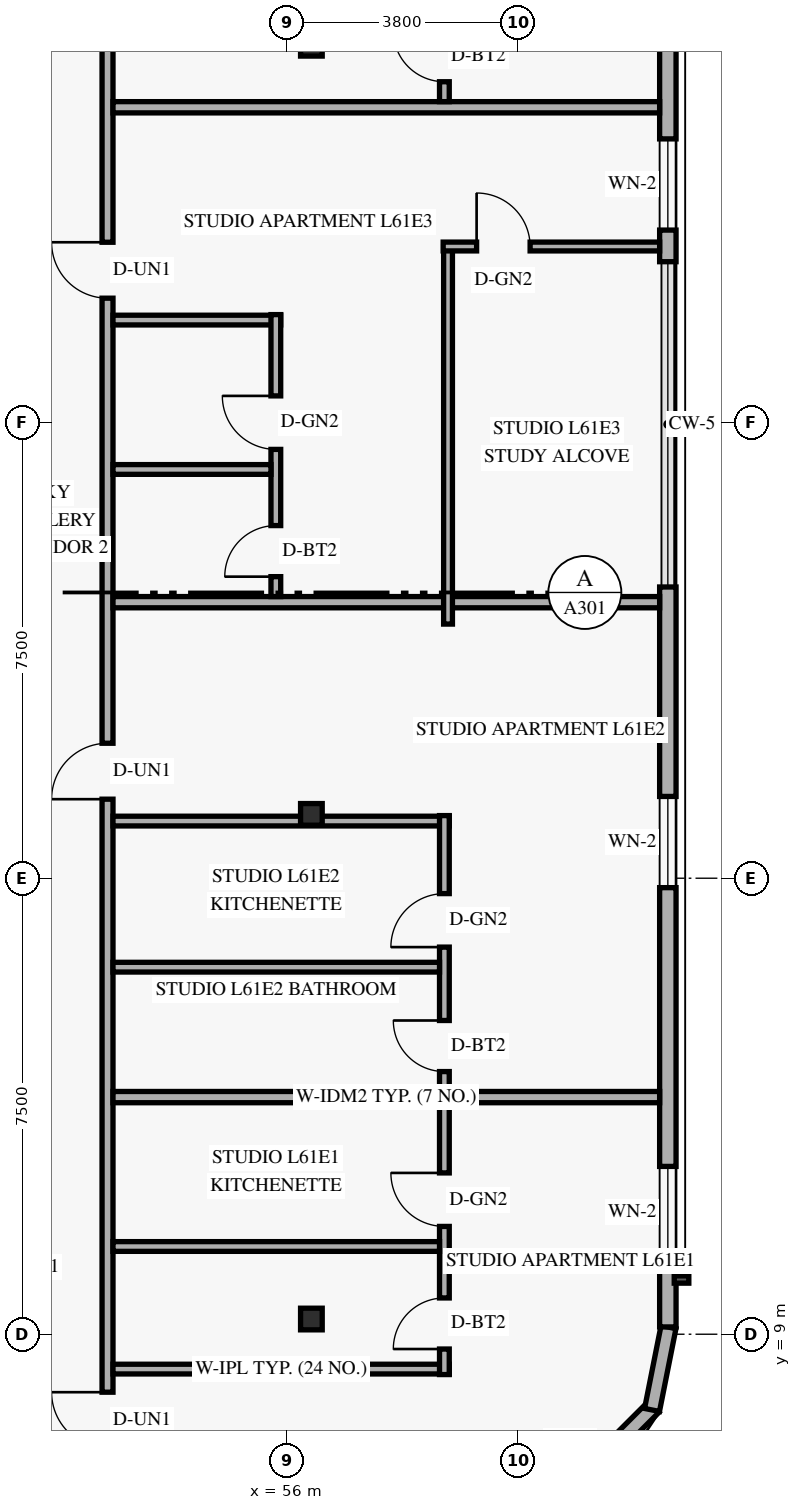
"""IFC4 building model, lengths in metres.
Left out: names, types, materials, properties, quantities, classifications, styles, units other than length and angle.
Written with IfcOpenShell. Run it as: python <this file> out.ifc"""

import sys

from ifc_helpers import new_model, si_unit, direction, frame, frame_2d, origin, origin_2d, place, context, subcontext, project, spatial, rectangle, hollow_rectangle, extrude, element, fill, save


model = new_model("IFC4")
c1 = context("Model", 3, precision=1e-05, world=origin(), true_north=direction((0.0, 1.0)))
c2 = subcontext(c1, "Body", "Model", "MODEL_VIEW")
j1 = project(units=[si_unit("LENGTHUNIT", "METRE"), si_unit("PLANEANGLEUNIT", "RADIAN")], contexts=[c1])
p1 = place(None, origin())
s1 = spatial("IfcSite", under=j1, at=p1, CompositionType="ELEMENT")
p2 = place(p1, origin())
s2 = spatial("IfcBuilding", under=s1, at=p2, CompositionType="ELEMENT")
p3 = place(p2, frame((0.0, 0.0, 235.2)))
s3 = spatial("IfcBuildingStorey", under=s2, at=p3, CompositionType="ELEMENT", Elevation=235.2)
for number, where, z_axis, x_axis in (
    (1, (56.298, 9.25, 0.0), (0.058, 0.0, 0.998), (0.0, 1.0, 0.0)),
    (2, (56.298, 17.55, 0.0), (0.058, 0.0, 0.998), (0.0, 1.0, 0.0)),
    (3, (56.298, 30.2, 0.0), (0.058, 0.0, 0.998), (0.0, 1.0, 0.0)),
):
    element("IfcColumn", number, at=place(p3, frame(where, z_axis=z_axis, x_axis=x_axis)), inside=s3, PredefinedType="COLUMN", context=c2, shape_type="SweptSolid", body=[
        extrude(hollow_rectangle(XDim=0.356, YDim=0.356, WallThickness=0.016, at=origin_2d()), origin(), (0.0, 0.0, 1.0), 3.606),
    ])
p4 = place(p3, frame((60.095, 5.868, 0.0), z_axis=(0.0, 0.0, 1.0), x_axis=(0.707106781187, 0.707106781187, 0.0)))
e4 = element("IfcWall", 4, at=p4, inside=s3, PredefinedType="SOLIDWALL", context=c2, shape_type="SweptSolid", body=[
    extrude(rectangle(XDim=2.739, YDim=0.25, at=frame_2d((1.37, 0.0))), origin(), (0.0, 0.0, 1.0), 3.36),
])
p5 = place(p4, frame((0.77, 0.0, 0.85)))
e5 = element("IfcOpeningElement", 5, at=p5, cuts=e4, PredefinedType="OPENING", context=c2, shape_type="SweptSolid", body=[
    extrude(rectangle(XDim=1.2, YDim=1.5, at=frame_2d((0.6, 0.75))), frame((0.0, 0.135, 0.0), z_axis=(0.0, -1.0, 0.0), x_axis=(1.0, 0.0, 0.0)), (0.0, 0.0, 1.0), 0.27),
])
p6 = place(p3, frame((62.005, 7.754, 0.0), z_axis=(0.0, 0.0, 1.0), x_axis=(0.195135625965, 0.9807762678, 0.0)))
e6 = element("IfcWall", 6, at=p6, inside=s3, PredefinedType="SOLIDWALL", context=c2, shape_type="SweptSolid", body=[
    extrude(rectangle(XDim=1.389, YDim=0.25, at=frame_2d((0.694, 0.0))), origin(), (0.0, 0.0, 1.0), 3.36),
])
p7 = place(p3, frame((62.265, 9.12, 0.0), z_axis=(0.0, 0.0, 1.0), x_axis=(0.0, 1.0, 0.0)))
e7 = element("IfcWall", 7, at=p7, inside=s3, PredefinedType="SOLIDWALL", context=c2, shape_type="SweptSolid", body=[
    extrude(rectangle(XDim=12.17, YDim=0.27, at=frame_2d((6.085, 0.0))), origin(), (0.0, 0.0, 1.0), 3.36),
])
p8 = place(p7, frame((1.14, 0.0, 0.85)))
e8 = element("IfcOpeningElement", 8, at=p8, cuts=e7, PredefinedType="OPENING", context=c2, shape_type="SweptSolid", body=[
    extrude(rectangle(XDim=1.5, YDim=1.55, at=frame_2d((0.75, 0.775))), frame((0.0, 0.145, 0.0), z_axis=(0.0, -1.0, 0.0), x_axis=(1.0, 0.0, 0.0)), (0.0, 0.0, 1.0), 0.29),
])
p9 = place(p7, frame((7.225, 0.0, 0.85)))
e9 = element("IfcOpeningElement", 9, at=p9, cuts=e7, PredefinedType="OPENING", context=c2, shape_type="SweptSolid", body=[
    extrude(rectangle(XDim=1.5, YDim=1.55, at=frame_2d((0.75, 0.775))), frame((0.0, 0.145, 0.0), z_axis=(0.0, -1.0, 0.0), x_axis=(1.0, 0.0, 0.0)), (0.0, 0.0, 1.0), 0.29),
])
p10 = place(p3, frame((62.265, 26.64, 0.0), z_axis=(0.0, 0.0, 1.0), x_axis=(0.0, 1.0, 0.0)))
e10 = element("IfcWall", 10, at=p10, inside=s3, PredefinedType="SOLIDWALL", context=c2, shape_type="SweptSolid", body=[
    extrude(rectangle(XDim=12.24, YDim=0.27, at=frame_2d((6.12, 0.0))), origin(), (0.0, 0.0, 1.0), 3.36),
])
p11 = place(p10, frame((0.52, 0.0, 0.85)))
e11 = element("IfcOpeningElement", 11, at=p11, cuts=e10, PredefinedType="OPENING", context=c2, shape_type="SweptSolid", body=[
    extrude(rectangle(XDim=1.5, YDim=1.55, at=frame_2d((0.75, 0.775))), frame((0.0, 0.145, 0.0), z_axis=(0.0, -1.0, 0.0), x_axis=(1.0, 0.0, 0.0)), (0.0, 0.0, 1.0), 0.29),
])
p12 = place(p10, frame((5.305, 0.0, 0.85)))
e12 = element("IfcOpeningElement", 12, at=p12, cuts=e10, PredefinedType="OPENING", context=c2, shape_type="SweptSolid", body=[
    extrude(rectangle(XDim=1.5, YDim=1.55, at=frame_2d((0.75, 0.775))), frame((0.0, 0.145, 0.0), z_axis=(0.0, -1.0, 0.0), x_axis=(1.0, 0.0, 0.0)), (0.0, 0.0, 1.0), 0.29),
])
p13 = place(p10, frame((10.155, 0.0, 0.85)))
e13 = element("IfcOpeningElement", 13, at=p13, cuts=e10, PredefinedType="OPENING", context=c2, shape_type="SweptSolid", body=[
    extrude(rectangle(XDim=1.5, YDim=1.55, at=frame_2d((0.75, 0.775))), frame((0.0, 0.145, 0.0), z_axis=(0.0, -1.0, 0.0), x_axis=(1.0, 0.0, 0.0)), (0.0, 0.0, 1.0), 0.29),
])
p14 = place(p3, frame((53.05, 5.77, 0.0), z_axis=(0.0, 0.0, 1.0), x_axis=(0.0, 1.0, 0.0)))
e14 = element("IfcWall", 14, at=p14, inside=s3, PredefinedType="STANDARD", context=c2, shape_type="SweptSolid", body=[
    extrude(rectangle(XDim=36.46, YDim=0.18, at=frame_2d((18.23, 0.0))), origin(), (0.0, 0.0, 1.0), 2.803),
])
p15 = place(p14, frame((1.357, 0.0, 0.0)))
e15 = element("IfcOpeningElement", 15, at=p15, cuts=e14, PredefinedType="OPENING", context=c2, shape_type="SweptSolid", body=[
    extrude(rectangle(XDim=0.92, YDim=2.15, at=frame_2d((0.46, 1.075))), frame((0.0, 0.1, 0.0), z_axis=(0.0, -1.0, 0.0), x_axis=(1.0, 0.0, 0.0)), (0.0, 0.0, 1.0), 0.2),
])
p16 = place(p14, frame((12.03, 0.0, 0.0)))
e16 = element("IfcOpeningElement", 16, at=p16, cuts=e14, PredefinedType="OPENING", context=c2, shape_type="SweptSolid", body=[
    extrude(rectangle(XDim=0.92, YDim=2.15, at=frame_2d((0.46, 1.075))), frame((0.0, 0.1, 0.0), z_axis=(0.0, -1.0, 0.0), x_axis=(1.0, 0.0, 0.0)), (0.0, 0.0, 1.0), 0.2),
])
p17 = place(p14, frame((20.27, 0.0, 0.0)))
e17 = element("IfcOpeningElement", 17, at=p17, cuts=e14, PredefinedType="OPENING", context=c2, shape_type="SweptSolid", body=[
    extrude(rectangle(XDim=0.92, YDim=2.15, at=frame_2d((0.46, 1.075))), frame((0.0, 0.1, 0.0), z_axis=(0.0, -1.0, 0.0), x_axis=(1.0, 0.0, 0.0)), (0.0, 0.0, 1.0), 0.2),
])
p18 = place(p14, frame((28.21, 0.0, 0.0)))
e18 = element("IfcOpeningElement", 18, at=p18, cuts=e14, PredefinedType="OPENING", context=c2, shape_type="SweptSolid", body=[
    extrude(rectangle(XDim=0.92, YDim=2.15, at=frame_2d((0.46, 1.075))), frame((0.0, 0.1, 0.0), z_axis=(0.0, -1.0, 0.0), x_axis=(1.0, 0.0, 0.0)), (0.0, 0.0, 1.0), 0.2),
])
p19 = place(p14, frame((35.21, 0.0, 0.0)))
e19 = element("IfcOpeningElement", 19, at=p19, cuts=e14, PredefinedType="OPENING", context=c2, shape_type="SweptSolid", body=[
    extrude(rectangle(XDim=0.92, YDim=2.15, at=frame_2d((0.46, 1.075))), frame((0.0, 0.1, 0.0), z_axis=(0.0, -1.0, 0.0), x_axis=(1.0, 0.0, 0.0)), (0.0, 0.0, 1.0), 0.2),
])
p20 = place(p3, frame((53.14, 8.427, 0.0), z_axis=(0.0, 0.0, 1.0), x_axis=(1.0, 0.0, 0.0)))
e20 = element("IfcWall", 20, at=p20, inside=s3, PredefinedType="PLUMBINGWALL", context=c2, shape_type="SweptSolid", body=[
    extrude(rectangle(XDim=5.53, YDim=0.16, at=frame_2d((2.765, 0.0))), origin(), (0.0, 0.0, 1.0), 2.879),
])
p21 = place(p3, frame((58.59, 8.337, 0.0), z_axis=(0.0, 0.0, 1.0), x_axis=(0.0, 1.0, 0.0)))
e21 = element("IfcWall", 21, at=p21, inside=s3, PredefinedType="PLUMBINGWALL", context=c2, shape_type="SweptSolid", body=[
    extrude(rectangle(XDim=4.563, YDim=0.16, at=frame_2d((2.282, 0.0))), origin(), (0.0, 0.0, 1.0), 3.36),
])
p22 = place(p21, frame((0.42, 0.0, 0.0)))
e22 = element("IfcOpeningElement", 22, at=p22, cuts=e21, PredefinedType="OPENING", context=c2, shape_type="SweptSolid", body=[
    extrude(rectangle(XDim=0.84, YDim=2.12, at=frame_2d((0.42, 1.06))), frame((0.0, 0.09, 0.0), z_axis=(0.0, -1.0, 0.0), x_axis=(1.0, 0.0, 0.0)), (0.0, 0.0, 1.0), 0.18),
])
p23 = place(p21, frame((2.436, 0.0, 0.0)))
e23 = element("IfcOpeningElement", 23, at=p23, cuts=e21, PredefinedType="OPENING", context=c2, shape_type="SweptSolid", body=[
    extrude(rectangle(XDim=0.88, YDim=2.12, at=frame_2d((0.44, 1.06))), frame((0.0, 0.09, 0.0), z_axis=(0.0, -1.0, 0.0), x_axis=(1.0, 0.0, 0.0)), (0.0, 0.0, 1.0), 0.18),
])
p24 = place(p3, frame((53.14, 10.443, 0.0), z_axis=(0.0, 0.0, 1.0), x_axis=(1.0, 0.0, 0.0)))
e24 = element("IfcWall", 24, at=p24, inside=s3, PredefinedType="PLUMBINGWALL", context=c2, shape_type="SweptSolid", body=[
    extrude(rectangle(XDim=5.37, YDim=0.16, at=frame_2d((2.685, 0.0))), origin(), (0.0, 0.0, 1.0), 2.879),
])
p25 = place(p3, frame((53.14, 12.9, 0.0), z_axis=(0.0, 0.0, 1.0), x_axis=(1.0, 0.0, 0.0)))
e25 = element("IfcWall", 25, at=p25, inside=s3, PredefinedType="PARTITIONING", context=c2, shape_type="SweptSolid", body=[
    extrude(rectangle(XDim=8.99, YDim=0.185, at=frame_2d((4.495, 0.0))), origin(), (0.0, 0.0, 1.0), 2.879),
])
p26 = place(p3, frame((53.14, 17.44, 0.0), z_axis=(0.0, 0.0, 1.0), x_axis=(1.0, 0.0, 0.0)))
e26 = element("IfcWall", 26, at=p26, inside=s3, PredefinedType="PLUMBINGWALL", context=c2, shape_type="SweptSolid", body=[
    extrude(rectangle(XDim=5.53, YDim=0.16, at=frame_2d((2.765, 0.0))), origin(), (0.0, 0.0, 1.0), 2.803),
])
p27 = place(p3, frame((58.59, 12.992, 0.0), z_axis=(0.0, 0.0, 1.0), x_axis=(0.0, 1.0, 0.0)))
e27 = element("IfcWall", 27, at=p27, inside=s3, PredefinedType="PLUMBINGWALL", context=c2, shape_type="SweptSolid", body=[
    extrude(rectangle(XDim=4.538, YDim=0.16, at=frame_2d((2.269, 0.0))), origin(), (0.0, 0.0, 1.0), 3.36),
])
p28 = place(p27, frame((0.327, 0.0, 0.0)))
e28 = element("IfcOpeningElement", 28, at=p28, cuts=e27, PredefinedType="OPENING", context=c2, shape_type="SweptSolid", body=[
    extrude(rectangle(XDim=0.84, YDim=2.12, at=frame_2d((0.42, 1.06))), frame((0.0, 0.09, 0.0), z_axis=(0.0, -1.0, 0.0), x_axis=(1.0, 0.0, 0.0)), (0.0, 0.0, 1.0), 0.18),
])
p29 = place(p27, frame((2.375, 0.0, 0.0)))
e29 = element("IfcOpeningElement", 29, at=p29, cuts=e27, PredefinedType="OPENING", context=c2, shape_type="SweptSolid", body=[
    extrude(rectangle(XDim=0.88, YDim=2.12, at=frame_2d((0.44, 1.06))), frame((0.0, 0.09, 0.0), z_axis=(0.0, -1.0, 0.0), x_axis=(1.0, 0.0, 0.0)), (0.0, 0.0, 1.0), 0.18),
])
p30 = place(p3, frame((53.14, 15.037, 0.0), z_axis=(0.0, 0.0, 1.0), x_axis=(1.0, 0.0, 0.0)))
e30 = element("IfcWall", 30, at=p30, inside=s3, PredefinedType="PLUMBINGWALL", context=c2, shape_type="SweptSolid", body=[
    extrude(rectangle(XDim=5.37, YDim=0.16, at=frame_2d((2.685, 0.0))), origin(), (0.0, 0.0, 1.0), 2.879),
])
p31 = place(p3, frame((53.14, 21.04, 0.0), z_axis=(0.0, 0.0, 1.0), x_axis=(1.0, 0.0, 0.0)))
e31 = element("IfcWall", 31, at=p31, inside=s3, PredefinedType="PARTITIONING", context=c2, shape_type="SweptSolid", body=[
    extrude(rectangle(XDim=8.99, YDim=0.185, at=frame_2d((4.495, 0.0))), origin(), (0.0, 0.0, 1.0), 2.879),
])
p32 = place(p3, frame((53.14, 25.68, 0.0), z_axis=(0.0, 0.0, 1.0), x_axis=(1.0, 0.0, 0.0)))
e32 = element("IfcWall", 32, at=p32, inside=s3, PredefinedType="PLUMBINGWALL", context=c2, shape_type="SweptSolid", body=[
    extrude(rectangle(XDim=2.758, YDim=0.16, at=frame_2d((1.379, 0.0))), origin(), (0.0, 0.0, 1.0), 3.36),
])
p33 = place(p3, frame((55.818, 21.133, 0.0), z_axis=(0.0, 0.0, 1.0), x_axis=(0.0, 1.0, 0.0)))
e33 = element("IfcWall", 33, at=p33, inside=s3, PredefinedType="PLUMBINGWALL", context=c2, shape_type="SweptSolid", body=[
    extrude(rectangle(XDim=4.637, YDim=0.16, at=frame_2d((2.319, 0.0))), origin(), (0.0, 0.0, 1.0), 3.36),
])
p34 = place(p33, frame((0.327, 0.0, 0.0)))
e34 = element("IfcOpeningElement", 34, at=p34, cuts=e33, PredefinedType="OPENING", context=c2, shape_type="SweptSolid", body=[
    extrude(rectangle(XDim=0.84, YDim=2.12, at=frame_2d((0.42, 1.06))), frame((0.0, 0.09, 0.0), z_axis=(0.0, -1.0, 0.0), x_axis=(1.0, 0.0, 0.0)), (0.0, 0.0, 1.0), 0.18),
])
p35 = place(p33, frame((2.42, 0.0, 0.0)))
e35 = element("IfcOpeningElement", 35, at=p35, cuts=e33, PredefinedType="OPENING", context=c2, shape_type="SweptSolid", body=[
    extrude(rectangle(XDim=0.88, YDim=2.12, at=frame_2d((0.44, 1.06))), frame((0.0, 0.09, 0.0), z_axis=(0.0, -1.0, 0.0), x_axis=(1.0, 0.0, 0.0)), (0.0, 0.0, 1.0), 0.18),
])
p36 = place(p3, frame((53.14, 23.223, 0.0), z_axis=(0.0, 0.0, 1.0), x_axis=(1.0, 0.0, 0.0)))
e36 = element("IfcWall", 36, at=p36, inside=s3, PredefinedType="PLUMBINGWALL", context=c2, shape_type="SweptSolid", body=[
    extrude(rectangle(XDim=2.598, YDim=0.16, at=frame_2d((1.299, 0.0))), origin(), (0.0, 0.0, 1.0), 3.36),
])
p37 = place(p3, frame((58.65, 20.68, 0.0), z_axis=(0.0, 0.0, 1.0), x_axis=(0.0, 1.0, 0.0)))
e37 = element("IfcWall", 37, at=p37, inside=s3, PredefinedType="PARTITIONING", context=c2, shape_type="SweptSolid", body=[
    extrude(rectangle(XDim=6.21, YDim=0.145, at=frame_2d((3.105, 0.0))), origin(), (0.0, 0.0, 1.0), 3.36),
])
p38 = place(p3, frame((58.57, 26.89, 0.0), z_axis=(0.0, 0.0, 1.0), x_axis=(1.0, 0.0, 0.0)))
e38 = element("IfcWall", 38, at=p38, inside=s3, PredefinedType="PARTITIONING", context=c2, shape_type="SweptSolid", body=[
    extrude(rectangle(XDim=3.56, YDim=0.145, at=frame_2d((1.78, 0.0))), origin(), (0.0, 0.0, 1.0), 3.36),
])
p39 = place(p38, frame((0.55, 0.0, 0.0)))
e39 = element("IfcOpeningElement", 39, at=p39, cuts=e38, PredefinedType="OPENING", context=c2, shape_type="SweptSolid", body=[
    extrude(rectangle(XDim=0.88, YDim=2.12, at=frame_2d((0.44, 1.06))), frame((0.0, 0.083, 0.0), z_axis=(0.0, -1.0, 0.0), x_axis=(1.0, 0.0, 0.0)), (0.0, 0.0, 1.0), 0.165),
])
p40 = place(p3, frame((53.14, 29.18, 0.0), z_axis=(0.0, 0.0, 1.0), x_axis=(1.0, 0.0, 0.0)))
e40 = element("IfcWall", 40, at=p40, inside=s3, PredefinedType="PARTITIONING", context=c2, shape_type="SweptSolid", body=[
    extrude(rectangle(XDim=8.99, YDim=0.185, at=frame_2d((4.495, 0.0))), origin(), (0.0, 0.0, 1.0), 2.879),
])
p41 = place(p3, frame((58.59, 29.272, 0.0), z_axis=(0.0, 0.0, 1.0), x_axis=(0.0, 1.0, 0.0)))
e41 = element("IfcWall", 41, at=p41, inside=s3, PredefinedType="PLUMBINGWALL", context=c2, shape_type="SweptSolid", body=[
    extrude(rectangle(XDim=4.438, YDim=0.16, at=frame_2d((2.219, 0.0))), origin(), (0.0, 0.0, 1.0), 3.36),
])
p42 = place(p41, frame((0.327, 0.0, 0.0)))
e42 = element("IfcOpeningElement", 42, at=p42, cuts=e41, PredefinedType="OPENING", context=c2, shape_type="SweptSolid", body=[
    extrude(rectangle(XDim=0.84, YDim=2.12, at=frame_2d((0.42, 1.06))), frame((0.0, 0.09, 0.0), z_axis=(0.0, -1.0, 0.0), x_axis=(1.0, 0.0, 0.0)), (0.0, 0.0, 1.0), 0.18),
])
p43 = place(p41, frame((2.329, 0.0, 0.0)))
e43 = element("IfcOpeningElement", 43, at=p43, cuts=e41, PredefinedType="OPENING", context=c2, shape_type="SweptSolid", body=[
    extrude(rectangle(XDim=0.88, YDim=2.12, at=frame_2d((0.44, 1.06))), frame((0.0, 0.09, 0.0), z_axis=(0.0, -1.0, 0.0), x_axis=(1.0, 0.0, 0.0)), (0.0, 0.0, 1.0), 0.18),
])
p44 = place(p8, origin())
e44 = element("IfcWindow", 44, at=p44, inside=s3, PartitioningType="SINGLE_PANEL", PredefinedType="WINDOW", context=c2, shape_type="SweptSolid", body=[
    extrude(rectangle(XDim=1.5, YDim=1.55, at=frame_2d((0.75, 0.775))), frame((0.0, 0.03, 0.0), z_axis=(0.0, -1.0, 0.0), x_axis=(1.0, 0.0, 0.0)), (0.0, 0.0, 1.0), 0.06),
])
fill(e8, e44)
p45 = place(p9, origin())
e45 = element("IfcWindow", 45, at=p45, inside=s3, PartitioningType="SINGLE_PANEL", PredefinedType="WINDOW", context=c2, shape_type="SweptSolid", body=[
    extrude(rectangle(XDim=1.5, YDim=1.55, at=frame_2d((0.75, 0.775))), frame((0.0, 0.03, 0.0), z_axis=(0.0, -1.0, 0.0), x_axis=(1.0, 0.0, 0.0)), (0.0, 0.0, 1.0), 0.06),
])
fill(e9, e45)
p46 = place(p11, origin())
e46 = element("IfcWindow", 46, at=p46, inside=s3, PartitioningType="SINGLE_PANEL", PredefinedType="WINDOW", context=c2, shape_type="SweptSolid", body=[
    extrude(rectangle(XDim=1.5, YDim=1.55, at=frame_2d((0.75, 0.775))), frame((0.0, 0.03, 0.0), z_axis=(0.0, -1.0, 0.0), x_axis=(1.0, 0.0, 0.0)), (0.0, 0.0, 1.0), 0.06),
])
fill(e11, e46)
p47 = place(p15, origin())
e47 = element("IfcDoor", 47, at=p47, inside=s3, OperationType="SINGLE_SWING_RIGHT", PredefinedType="DOOR", context=c2, shape_type="SweptSolid", body=[
    extrude(rectangle(XDim=0.92, YDim=2.15, at=frame_2d((0.46, 1.075))), frame((0.0, 0.025, 0.0), z_axis=(0.0, -1.0, 0.0), x_axis=(1.0, 0.0, 0.0)), (0.0, 0.0, 1.0), 0.05),
])
fill(e15, e47)
p48 = place(p22, origin())
e48 = element("IfcDoor", 48, at=p48, inside=s3, OperationType="SINGLE_SWING_LEFT", PredefinedType="DOOR", context=c2, shape_type="SweptSolid", body=[
    extrude(rectangle(XDim=0.84, YDim=2.12, at=frame_2d((0.42, 1.06))), frame((0.0, 0.025, 0.0), z_axis=(0.0, -1.0, 0.0), x_axis=(1.0, 0.0, 0.0)), (0.0, 0.0, 1.0), 0.05),
])
fill(e22, e48)
p49 = place(p23, origin())
e49 = element("IfcDoor", 49, at=p49, inside=s3, OperationType="SINGLE_SWING_RIGHT", PredefinedType="DOOR", context=c2, shape_type="SweptSolid", body=[
    extrude(rectangle(XDim=0.88, YDim=2.12, at=frame_2d((0.44, 1.06))), frame((0.0, 0.025, 0.0), z_axis=(0.0, -1.0, 0.0), x_axis=(1.0, 0.0, 0.0)), (0.0, 0.0, 1.0), 0.05),
])
fill(e23, e49)
p50 = place(p16, origin())
e50 = element("IfcDoor", 50, at=p50, inside=s3, OperationType="SINGLE_SWING_LEFT", PredefinedType="DOOR", context=c2, shape_type="SweptSolid", body=[
    extrude(rectangle(XDim=0.92, YDim=2.15, at=frame_2d((0.46, 1.075))), frame((0.0, 0.025, 0.0), z_axis=(0.0, -1.0, 0.0), x_axis=(1.0, 0.0, 0.0)), (0.0, 0.0, 1.0), 0.05),
])
fill(e16, e50)
p51 = place(p28, origin())
e51 = element("IfcDoor", 51, at=p51, inside=s3, OperationType="SINGLE_SWING_RIGHT", PredefinedType="DOOR", context=c2, shape_type="SweptSolid", body=[
    extrude(rectangle(XDim=0.84, YDim=2.12, at=frame_2d((0.42, 1.06))), frame((0.0, 0.025, 0.0), z_axis=(0.0, -1.0, 0.0), x_axis=(1.0, 0.0, 0.0)), (0.0, 0.0, 1.0), 0.05),
])
fill(e28, e51)
p52 = place(p29, origin())
e52 = element("IfcDoor", 52, at=p52, inside=s3, OperationType="SINGLE_SWING_LEFT", PredefinedType="DOOR", context=c2, shape_type="SweptSolid", body=[
    extrude(rectangle(XDim=0.88, YDim=2.12, at=frame_2d((0.44, 1.06))), frame((0.0, 0.025, 0.0), z_axis=(0.0, -1.0, 0.0), x_axis=(1.0, 0.0, 0.0)), (0.0, 0.0, 1.0), 0.05),
])
fill(e29, e52)
p53 = place(p39, origin())
e53 = element("IfcDoor", 53, at=p53, inside=s3, OperationType="SINGLE_SWING_LEFT", PredefinedType="DOOR", context=c2, shape_type="SweptSolid", body=[
    extrude(rectangle(XDim=0.88, YDim=2.12, at=frame_2d((0.44, 1.06))), frame((0.0, 0.025, 0.0), z_axis=(0.0, -1.0, 0.0), x_axis=(1.0, 0.0, 0.0)), (0.0, 0.0, 1.0), 0.05),
])
fill(e39, e53)
p54 = place(p17, origin())
e54 = element("IfcDoor", 54, at=p54, inside=s3, OperationType="SINGLE_SWING_RIGHT", PredefinedType="DOOR", context=c2, shape_type="SweptSolid", body=[
    extrude(rectangle(XDim=0.92, YDim=2.15, at=frame_2d((0.46, 1.075))), frame((0.0, 0.025, 0.0), z_axis=(0.0, -1.0, 0.0), x_axis=(1.0, 0.0, 0.0)), (0.0, 0.0, 1.0), 0.05),
])
fill(e17, e54)
p55 = place(p34, origin())
e55 = element("IfcDoor", 55, at=p55, inside=s3, OperationType="SINGLE_SWING_LEFT", PredefinedType="DOOR", context=c2, shape_type="SweptSolid", body=[
    extrude(rectangle(XDim=0.84, YDim=2.12, at=frame_2d((0.42, 1.06))), frame((0.0, 0.025, 0.0), z_axis=(0.0, -1.0, 0.0), x_axis=(1.0, 0.0, 0.0)), (0.0, 0.0, 1.0), 0.05),
])
fill(e34, e55)
p56 = place(p35, origin())
e56 = element("IfcDoor", 56, at=p56, inside=s3, OperationType="SINGLE_SWING_RIGHT", PredefinedType="DOOR", context=c2, shape_type="SweptSolid", body=[
    extrude(rectangle(XDim=0.88, YDim=2.12, at=frame_2d((0.44, 1.06))), frame((0.0, 0.025, 0.0), z_axis=(0.0, -1.0, 0.0), x_axis=(1.0, 0.0, 0.0)), (0.0, 0.0, 1.0), 0.05),
])
fill(e35, e56)
p57 = place(p42, origin())
e57 = element("IfcDoor", 57, at=p57, inside=s3, OperationType="SINGLE_SWING_RIGHT", PredefinedType="DOOR", context=c2, shape_type="SweptSolid", body=[
    extrude(rectangle(XDim=0.84, YDim=2.12, at=frame_2d((0.42, 1.06))), frame((0.0, 0.025, 0.0), z_axis=(0.0, -1.0, 0.0), x_axis=(1.0, 0.0, 0.0)), (0.0, 0.0, 1.0), 0.05),
])
fill(e42, e57)
save(model, sys.argv[1])
